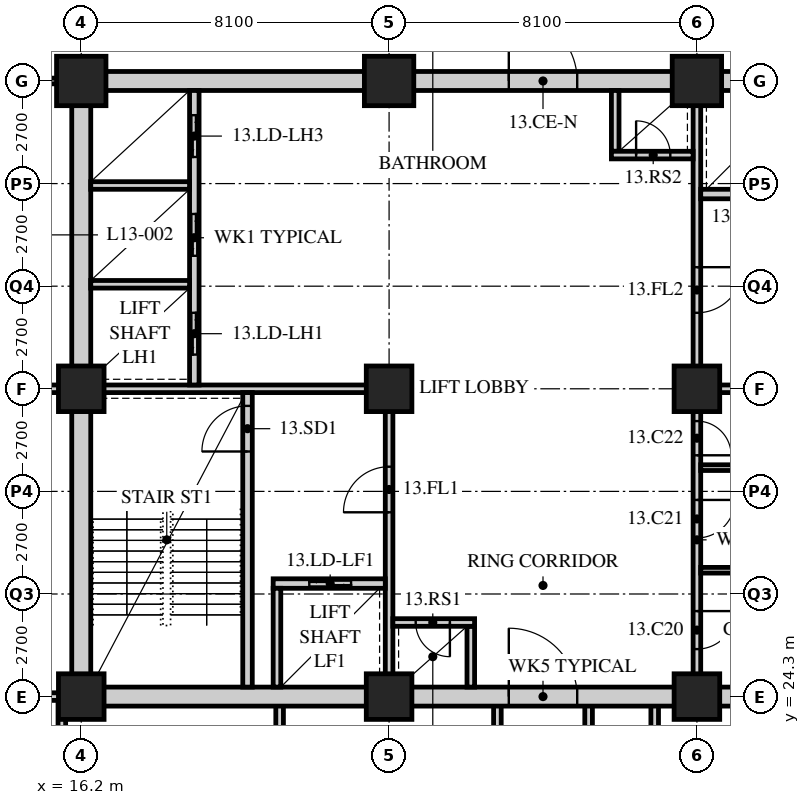
"""IFC4 building model, lengths in metres.
Left out: names, types, materials, properties, quantities, classifications, styles, units other than length and angle.
Written with IfcOpenShell. Run it as: python <this file> out.ifc"""

import sys

from ifc_helpers import new_model, si_unit, direction, frame, frame_2d, origin, origin_2d, place, context, subcontext, project, spatial, rectangle, hollow_rectangle, extrude, element, fill, save


model = new_model("IFC4")
c1 = context("Model", 3, precision=1e-05, world=origin(), true_north=direction((0.0, 1.0)))
c2 = subcontext(c1, "Body", "Model", "MODEL_VIEW")
j1 = project(units=[si_unit("LENGTHUNIT", "METRE"), si_unit("PLANEANGLEUNIT", "RADIAN")], contexts=[c1])
p1 = place(None, origin())
s1 = spatial("IfcSite", under=j1, at=p1, CompositionType="ELEMENT")
p2 = place(p1, origin())
s2 = spatial("IfcBuilding", under=s1, at=p2, CompositionType="ELEMENT")
p3 = place(p2, frame((0.0, 0.0, 56.8)))
s3 = spatial("IfcBuildingStorey", under=s2, at=p3, CompositionType="ELEMENT", Elevation=56.8)
for number, where, z_axis, x_axis in (
    (1, (16.2, 24.3, 0.0), (0.0, 0.0, 1.0), (1.0, 0.0, 0.0)),
    (2, (16.2, 32.4, 0.0), (0.0, 0.0, 1.0), (1.0, 0.0, 0.0)),
):
    element("IfcColumn", number, at=place(p3, frame(where, z_axis=z_axis, x_axis=x_axis)), inside=s3, PredefinedType="COLUMN", context=c2, shape_type="SweptSolid", body=[
        extrude(hollow_rectangle(XDim=1.2, YDim=1.2, WallThickness=0.12, at=origin_2d()), origin(), (0.0, 0.0, 1.0), 3.4),
    ])
p4 = place(p3, frame((16.2, 40.5, 0.0), z_axis=(0.0, 0.0, 1.0), x_axis=(1.0, 0.0, 0.0)))
e3 = element("IfcColumn", 3, at=p4, inside=s3, PredefinedType="COLUMN", context=c2, shape_type="SweptSolid", body=[
    extrude(hollow_rectangle(XDim=1.3, YDim=1.3, WallThickness=0.13, at=origin_2d()), origin(), (0.0, 0.0, 1.0), 3.4),
])
for number, where, z_axis, x_axis in (
    (4, (24.3, 24.3, 0.0), (0.0, 0.0, 1.0), (1.0, 0.0, 0.0)),
    (5, (24.3, 32.4, 0.0), (0.0, 0.0, 1.0), (1.0, 0.0, 0.0)),
):
    element("IfcColumn", number, at=place(p3, frame(where, z_axis=z_axis, x_axis=x_axis)), inside=s3, PredefinedType="COLUMN", context=c2, shape_type="SweptSolid", body=[
        extrude(hollow_rectangle(XDim=1.2, YDim=1.2, WallThickness=0.12, at=origin_2d()), origin(), (0.0, 0.0, 1.0), 3.4),
    ])
p5 = place(p3, frame((24.3, 40.5, 0.0), z_axis=(0.0, 0.0, 1.0), x_axis=(1.0, 0.0, 0.0)))
e6 = element("IfcColumn", 6, at=p5, inside=s3, PredefinedType="COLUMN", context=c2, shape_type="SweptSolid", body=[
    extrude(hollow_rectangle(XDim=1.3, YDim=1.3, WallThickness=0.13, at=origin_2d()), origin(), (0.0, 0.0, 1.0), 3.4),
])
for number, where, z_axis, x_axis in (
    (7, (32.4, 24.3, 0.0), (0.0, 0.0, 1.0), (1.0, 0.0, 0.0)),
    (8, (32.4, 32.4, 0.0), (0.0, 0.0, 1.0), (1.0, 0.0, 0.0)),
):
    element("IfcColumn", number, at=place(p3, frame(where, z_axis=z_axis, x_axis=x_axis)), inside=s3, PredefinedType="COLUMN", context=c2, shape_type="SweptSolid", body=[
        extrude(hollow_rectangle(XDim=1.2, YDim=1.2, WallThickness=0.12, at=origin_2d()), origin(), (0.0, 0.0, 1.0), 3.4),
    ])
p6 = place(p3, frame((32.4, 40.5, 0.0), z_axis=(0.0, 0.0, 1.0), x_axis=(1.0, 0.0, 0.0)))
e9 = element("IfcColumn", 9, at=p6, inside=s3, PredefinedType="COLUMN", context=c2, shape_type="SweptSolid", body=[
    extrude(hollow_rectangle(XDim=1.3, YDim=1.3, WallThickness=0.13, at=origin_2d()), origin(), (0.0, 0.0, 1.0), 3.4),
])
p7 = place(p3, frame((16.0, 40.5, 0.0), z_axis=(0.0, 0.0, 1.0), x_axis=(-1.0, 0.0, 0.0)))
e10 = element("IfcWall", 10, at=p7, inside=s3, PredefinedType="PARTITIONING", context=c2, shape_type="SweptSolid", body=[
    extrude(rectangle(XDim=2.05, YDim=0.15, at=frame_2d((1.025, 0.0))), origin(), (0.0, 0.0, 1.0), 2.578),
])
p8 = place(p3, frame((13.95, 32.4, 0.0), z_axis=(0.0, 0.0, 1.0), x_axis=(1.0, 0.0, 0.0)))
e11 = element("IfcWall", 11, at=p8, inside=s3, PredefinedType="SOLIDWALL", context=c2, shape_type="SweptSolid", body=[
    extrude(rectangle(XDim=2.25, YDim=0.2, at=frame_2d((1.125, 0.0))), origin(), (0.0, 0.0, 1.0), 2.578),
])
for number, where, z_axis, x_axis in (
    (12, (15.689, 13.95, 0.0), (0.0, 0.0, 1.0), (0.0, 1.0, 0.0)),
    (13, (21.42, 13.95, 0.0), (0.0, 0.0, 1.0), (0.0, 1.0, 0.0)),
    (14, (31.289, 13.95, 0.0), (0.0, 0.0, 1.0), (0.0, 1.0, 0.0)),
    (15, (27.15, 13.95, 0.0), (0.0, 0.0, 1.0), (0.0, 1.0, 0.0)),
    (16, (29.55, 13.95, 0.0), (0.0, 0.0, 1.0), (0.0, 1.0, 0.0)),
):
    element("IfcWall", number, at=place(p3, frame(where, z_axis=z_axis, x_axis=x_axis)), inside=s3, PredefinedType="SOLIDWALL", context=c2, shape_type="SweptSolid", body=[
        extrude(rectangle(XDim=10.35, YDim=0.2, at=frame_2d((5.175, 0.0))), origin(), (0.0, 0.0, 1.0), 3.19),
    ])
p9 = place(p3, frame((13.95, 24.3, 0.0), z_axis=(0.0, 0.0, 1.0), x_axis=(1.0, 0.0, 0.0)))
e17 = element("IfcWall", 17, at=p9, inside=s3, PredefinedType="SOLIDWALL", context=c2, shape_type="SweptSolid", body=[
    extrude(rectangle(XDim=2.25, YDim=0.2, at=frame_2d((1.125, 0.0))), origin(), (0.0, 0.0, 1.0), 2.578),
])
p10 = place(p3, frame((15.95, 24.3, 0.0), z_axis=(0.0, 0.0, 1.0), x_axis=(1.0, 0.0, 0.0)))
e18 = element("IfcWall", 18, at=p10, inside=s3, PredefinedType="SOLIDWALL", context=c2, shape_type="SweptSolid", body=[
    extrude(rectangle(XDim=24.8, YDim=0.5, at=frame_2d((12.4, 0.0))), origin(), (0.0, 0.0, 1.0), 2.54),
])
p11 = place(p10, frame((11.5, 0.0, 0.0)))
e19 = element("IfcOpeningElement", 19, at=p11, cuts=e18, PredefinedType="OPENING", context=c2, shape_type="SweptSolid", body=[
    extrude(rectangle(XDim=1.8, YDim=2.4, at=frame_2d((0.9, 1.2))), frame((0.0, 0.26, 0.0), z_axis=(0.0, -1.0, 0.0), x_axis=(1.0, 0.0, 0.0)), (0.0, 0.0, 1.0), 0.52),
])
p12 = place(p3, frame((15.95, 40.5, 0.0), z_axis=(0.0, 0.0, 1.0), x_axis=(1.0, 0.0, 0.0)))
e20 = element("IfcWall", 20, at=p12, inside=s3, PredefinedType="SOLIDWALL", context=c2, shape_type="SweptSolid", body=[
    extrude(rectangle(XDim=24.8, YDim=0.5, at=frame_2d((12.4, 0.0))), origin(), (0.0, 0.0, 1.0), 2.54),
])
p13 = place(p12, frame((11.5, 0.0, 0.0)))
e21 = element("IfcOpeningElement", 21, at=p13, cuts=e20, PredefinedType="OPENING", context=c2, shape_type="SweptSolid", body=[
    extrude(rectangle(XDim=1.8, YDim=2.4, at=frame_2d((0.9, 1.2))), frame((0.0, 0.26, 0.0), z_axis=(0.0, -1.0, 0.0), x_axis=(1.0, 0.0, 0.0)), (0.0, 0.0, 1.0), 0.52),
])
p14 = place(p3, frame((16.2, 24.55, 0.0), z_axis=(0.0, 0.0, 1.0), x_axis=(0.0, 1.0, 0.0)))
e22 = element("IfcWall", 22, at=p14, inside=s3, PredefinedType="SOLIDWALL", context=c2, shape_type="SweptSolid", body=[
    extrude(rectangle(XDim=15.7, YDim=0.5, at=frame_2d((7.85, 0.0))), origin(), (0.0, 0.0, 1.0), 2.578),
])
p15 = place(p3, frame((16.45, 32.4, 0.0), z_axis=(0.0, 0.0, 1.0), x_axis=(1.0, 0.0, 0.0)))
e23 = element("IfcWall", 23, at=p15, inside=s3, PredefinedType="SOLIDWALL", context=c2, shape_type="SweptSolid", body=[
    extrude(rectangle(XDim=7.95, YDim=0.2, at=frame_2d((3.975, 0.0))), origin(), (0.0, 0.0, 1.0), 2.578),
])
p16 = place(p3, frame((24.3, 24.55, 0.0), z_axis=(0.0, 0.0, 1.0), x_axis=(0.0, 1.0, 0.0)))
e24 = element("IfcWall", 24, at=p16, inside=s3, PredefinedType="SOLIDWALL", context=c2, shape_type="SweptSolid", body=[
    extrude(rectangle(XDim=7.75, YDim=0.2, at=frame_2d((3.875, 0.0))), origin(), (0.0, 0.0, 1.0), 2.578),
])
p17 = place(p16, frame((4.6, 0.0, 0.0)))
e25 = element("IfcOpeningElement", 25, at=p17, cuts=e24, PredefinedType="OPENING", context=c2, shape_type="SweptSolid", body=[
    extrude(rectangle(XDim=1.2, YDim=2.1, at=frame_2d((0.6, 1.05))), frame((0.0, 0.11, 0.0), z_axis=(0.0, -1.0, 0.0), x_axis=(1.0, 0.0, 0.0)), (0.0, 0.0, 1.0), 0.22),
])
p18 = place(p3, frame((20.575, 24.55, 0.0), z_axis=(0.0, 0.0, 1.0), x_axis=(0.0, 1.0, 0.0)))
e26 = element("IfcWall", 26, at=p18, inside=s3, PredefinedType="SOLIDWALL", context=c2, shape_type="SweptSolid", body=[
    extrude(rectangle(XDim=7.75, YDim=0.25, at=frame_2d((3.875, 0.0))), origin(), (0.0, 0.0, 1.0), 3.19),
])
p19 = place(p18, frame((6.2, 0.0, 0.0)))
e27 = element("IfcOpeningElement", 27, at=p19, cuts=e26, PredefinedType="OPENING", context=c2, shape_type="SweptSolid", body=[
    extrude(rectangle(XDim=1.2, YDim=2.1, at=frame_2d((0.6, 1.05))), frame((0.0, 0.135, 0.0), z_axis=(0.0, -1.0, 0.0), x_axis=(1.0, 0.0, 0.0)), (0.0, 0.0, 1.0), 0.27),
])
p20 = place(p3, frame((21.25, 27.275, 0.0), z_axis=(0.0, 0.0, 1.0), x_axis=(1.0, 0.0, 0.0)))
e28 = element("IfcWall", 28, at=p20, inside=s3, PredefinedType="SOLIDWALL", context=c2, shape_type="SweptSolid", body=[
    extrude(rectangle(XDim=2.95, YDim=0.25, at=frame_2d((1.475, 0.0))), origin(), (0.0, 0.0, 1.0), 3.19),
])
p21 = place(p20, frame((0.95, 0.0, 0.0)))
e29 = element("IfcOpeningElement", 29, at=p21, cuts=e28, PredefinedType="OPENING", context=c2, shape_type="SweptSolid", body=[
    extrude(rectangle(XDim=1.1, YDim=2.4, at=frame_2d((0.55, 1.2))), frame((0.0, 0.135, 0.0), z_axis=(0.0, -1.0, 0.0), x_axis=(1.0, 0.0, 0.0)), (0.0, 0.0, 1.0), 0.27),
])
p22 = place(p3, frame((21.35, 24.55, 0.0), z_axis=(0.0, 0.0, 1.0), x_axis=(0.0, 1.0, 0.0)))
e30 = element("IfcWall", 30, at=p22, inside=s3, PredefinedType="SOLIDWALL", context=c2, shape_type="SweptSolid", body=[
    extrude(rectangle(XDim=2.6, YDim=0.2, at=frame_2d((1.3, 0.0))), origin(), (0.0, 0.0, 1.0), 3.19),
])
p23 = place(p3, frame((19.175, 32.5, 0.0), z_axis=(0.0, 0.0, 1.0), x_axis=(0.0, 1.0, 0.0)))
e31 = element("IfcWall", 31, at=p23, inside=s3, PredefinedType="SOLIDWALL", context=c2, shape_type="SweptSolid", body=[
    extrude(rectangle(XDim=7.75, YDim=0.25, at=frame_2d((3.875, 0.0))), origin(), (0.0, 0.0, 1.0), 3.19),
])
p24 = place(p23, frame((0.8, 0.0, 0.0)))
e32 = element("IfcOpeningElement", 32, at=p24, cuts=e31, PredefinedType="OPENING", context=c2, shape_type="SweptSolid", body=[
    extrude(rectangle(XDim=1.1, YDim=2.4, at=frame_2d((0.55, 1.2))), frame((0.0, 0.135, 0.0), z_axis=(0.0, -1.0, 0.0), x_axis=(1.0, 0.0, 0.0)), (0.0, 0.0, 1.0), 0.27),
])
p25 = place(p23, frame((3.4, 0.0, 0.0)))
e33 = element("IfcOpeningElement", 33, at=p25, cuts=e31, PredefinedType="OPENING", context=c2, shape_type="SweptSolid", body=[
    extrude(rectangle(XDim=1.1, YDim=2.4, at=frame_2d((0.55, 1.2))), frame((0.0, 0.135, 0.0), z_axis=(0.0, -1.0, 0.0), x_axis=(1.0, 0.0, 0.0)), (0.0, 0.0, 1.0), 0.27),
])
p26 = place(p23, frame((6.0, 0.0, 0.0)))
e34 = element("IfcOpeningElement", 34, at=p26, cuts=e31, PredefinedType="OPENING", context=c2, shape_type="SweptSolid", body=[
    extrude(rectangle(XDim=1.1, YDim=2.4, at=frame_2d((0.55, 1.2))), frame((0.0, 0.135, 0.0), z_axis=(0.0, -1.0, 0.0), x_axis=(1.0, 0.0, 0.0)), (0.0, 0.0, 1.0), 0.27),
])
for number, where, z_axis, x_axis in (
    (35, (16.45, 35.15, 0.0), (0.0, 0.0, 1.0), (1.0, 0.0, 0.0)),
    (36, (16.45, 37.75, 0.0), (0.0, 0.0, 1.0), (1.0, 0.0, 0.0)),
):
    element("IfcWall", number, at=place(p3, frame(where, z_axis=z_axis, x_axis=x_axis)), inside=s3, PredefinedType="SOLIDWALL", context=c2, shape_type="SweptSolid", body=[
        extrude(rectangle(XDim=2.6, YDim=0.2, at=frame_2d((1.3, 0.0))), origin(), (0.0, 0.0, 1.0), 3.19),
    ])
p27 = place(p3, frame((26.45, 24.55, 0.0), z_axis=(0.0, 0.0, 1.0), x_axis=(0.0, 1.0, 0.0)))
e37 = element("IfcWall", 37, at=p27, inside=s3, PredefinedType="SOLIDWALL", context=c2, shape_type="SweptSolid", body=[
    extrude(rectangle(XDim=1.6, YDim=0.2, at=frame_2d((0.8, 0.0))), origin(), (0.0, 0.0, 1.0), 3.19),
])
p28 = place(p3, frame((24.4, 26.25, 0.0), z_axis=(0.0, 0.0, 1.0), x_axis=(1.0, 0.0, 0.0)))
e38 = element("IfcWall", 38, at=p28, inside=s3, PredefinedType="SOLIDWALL", context=c2, shape_type="SweptSolid", body=[
    extrude(rectangle(XDim=2.15, YDim=0.2, at=frame_2d((1.075, 0.0))), origin(), (0.0, 0.0, 1.0), 3.19),
])
p29 = place(p28, frame((0.6, 0.0, 0.0)))
e39 = element("IfcOpeningElement", 39, at=p29, cuts=e38, PredefinedType="OPENING", context=c2, shape_type="SweptSolid", body=[
    extrude(rectangle(XDim=0.9, YDim=2.1, at=frame_2d((0.45, 1.05))), frame((0.0, 0.11, 0.0), z_axis=(0.0, -1.0, 0.0), x_axis=(1.0, 0.0, 0.0)), (0.0, 0.0, 1.0), 0.22),
])
p30 = place(p3, frame((32.3, 32.4, 0.0), z_axis=(0.0, 0.0, 1.0), x_axis=(1.0, 0.0, 0.0)))
e40 = element("IfcWall", 40, at=p30, inside=s3, PredefinedType="SOLIDWALL", context=c2, shape_type="SweptSolid", body=[
    extrude(rectangle(XDim=7.95, YDim=0.2, at=frame_2d((3.975, 0.0))), origin(), (0.0, 0.0, 1.0), 2.578),
])
p31 = place(p3, frame((32.4, 32.5, 0.0), z_axis=(0.0, 0.0, 1.0), x_axis=(0.0, 1.0, 0.0)))
e41 = element("IfcWall", 41, at=p31, inside=s3, PredefinedType="SOLIDWALL", context=c2, shape_type="SweptSolid", body=[
    extrude(rectangle(XDim=7.75, YDim=0.2, at=frame_2d((3.875, 0.0))), origin(), (0.0, 0.0, 1.0), 2.578),
])
p32 = place(p31, frame((1.9, 0.0, 0.0)))
e42 = element("IfcOpeningElement", 42, at=p32, cuts=e41, PredefinedType="OPENING", context=c2, shape_type="SweptSolid", body=[
    extrude(rectangle(XDim=1.2, YDim=2.1, at=frame_2d((0.6, 1.05))), frame((0.0, 0.11, 0.0), z_axis=(0.0, -1.0, 0.0), x_axis=(1.0, 0.0, 0.0)), (0.0, 0.0, 1.0), 0.22),
])
p33 = place(p3, frame((32.5, 37.525, 0.0), z_axis=(0.0, 0.0, 1.0), x_axis=(1.0, 0.0, 0.0)))
e43 = element("IfcWall", 43, at=p33, inside=s3, PredefinedType="SOLIDWALL", context=c2, shape_type="SweptSolid", body=[
    extrude(rectangle(XDim=2.95, YDim=0.25, at=frame_2d((1.475, 0.0))), origin(), (0.0, 0.0, 1.0), 3.19),
])
p34 = place(p33, frame((0.9, 0.0, 0.0)))
e44 = element("IfcOpeningElement", 44, at=p34, cuts=e43, PredefinedType="OPENING", context=c2, shape_type="SweptSolid", body=[
    extrude(rectangle(XDim=1.1, YDim=2.4, at=frame_2d((0.55, 1.2))), frame((0.0, 0.135, 0.0), z_axis=(0.0, -1.0, 0.0), x_axis=(1.0, 0.0, 0.0)), (0.0, 0.0, 1.0), 0.27),
])
p35 = place(p3, frame((30.25, 38.65, 0.0), z_axis=(0.0, 0.0, 1.0), x_axis=(0.0, 1.0, 0.0)))
e45 = element("IfcWall", 45, at=p35, inside=s3, PredefinedType="SOLIDWALL", context=c2, shape_type="SweptSolid", body=[
    extrude(rectangle(XDim=1.6, YDim=0.2, at=frame_2d((0.8, 0.0))), origin(), (0.0, 0.0, 1.0), 3.19),
])
p36 = place(p3, frame((30.15, 38.55, 0.0), z_axis=(0.0, 0.0, 1.0), x_axis=(1.0, 0.0, 0.0)))
e46 = element("IfcWall", 46, at=p36, inside=s3, PredefinedType="SOLIDWALL", context=c2, shape_type="SweptSolid", body=[
    extrude(rectangle(XDim=2.15, YDim=0.2, at=frame_2d((1.075, 0.0))), origin(), (0.0, 0.0, 1.0), 3.19),
])
p37 = place(p36, frame((0.65, 0.0, 0.0)))
e47 = element("IfcOpeningElement", 47, at=p37, cuts=e46, PredefinedType="OPENING", context=c2, shape_type="SweptSolid", body=[
    extrude(rectangle(XDim=0.9, YDim=2.1, at=frame_2d((0.45, 1.05))), frame((0.0, 0.11, 0.0), z_axis=(0.0, -1.0, 0.0), x_axis=(1.0, 0.0, 0.0)), (0.0, 0.0, 1.0), 0.22),
])
p38 = place(p3, frame((32.4, 24.55, 0.0), z_axis=(0.0, 0.0, 1.0), x_axis=(0.0, 1.0, 0.0)))
e48 = element("IfcWall", 48, at=p38, inside=s3, PredefinedType="PARTITIONING", context=c2, shape_type="SweptSolid", body=[
    extrude(rectangle(XDim=7.75, YDim=0.2, at=frame_2d((3.875, 0.0))), origin(), (0.0, 0.0, 1.0), 2.578),
])
p39 = place(p38, frame((1.0, 0.0, 0.0)))
e49 = element("IfcOpeningElement", 49, at=p39, cuts=e48, PredefinedType="OPENING", context=c2, shape_type="SweptSolid", body=[
    extrude(rectangle(XDim=1.0, YDim=2.1, at=frame_2d((0.5, 1.05))), frame((0.0, 0.11, 0.0), z_axis=(0.0, -1.0, 0.0), x_axis=(1.0, 0.0, 0.0)), (0.0, 0.0, 1.0), 0.22),
])
p40 = place(p38, frame((3.925, 0.0, 0.0)))
e50 = element("IfcOpeningElement", 50, at=p40, cuts=e48, PredefinedType="OPENING", context=c2, shape_type="SweptSolid", body=[
    extrude(rectangle(XDim=1.0, YDim=2.1, at=frame_2d((0.5, 1.05))), frame((0.0, 0.11, 0.0), z_axis=(0.0, -1.0, 0.0), x_axis=(1.0, 0.0, 0.0)), (0.0, 0.0, 1.0), 0.22),
])
p41 = place(p38, frame((6.1, 0.0, 0.0)))
e51 = element("IfcOpeningElement", 51, at=p41, cuts=e48, PredefinedType="OPENING", context=c2, shape_type="SweptSolid", body=[
    extrude(rectangle(XDim=0.9, YDim=2.1, at=frame_2d((0.45, 1.05))), frame((0.0, 0.11, 0.0), z_axis=(0.0, -1.0, 0.0), x_axis=(1.0, 0.0, 0.0)), (0.0, 0.0, 1.0), 0.22),
])
for number, where, z_axis, x_axis in (
    (52, (32.5, 27.625, 0.0), (0.0, 0.0, 1.0), (1.0, 0.0, 0.0)),
    (53, (32.5, 30.325, 0.0), (0.0, 0.0, 1.0), (1.0, 0.0, 0.0)),
):
    element("IfcWall", number, at=place(p3, frame(where, z_axis=z_axis, x_axis=x_axis)), inside=s3, PredefinedType="PARTITIONING", context=c2, shape_type="SweptSolid", body=[
        extrude(rectangle(XDim=4.9, YDim=0.15, at=frame_2d((2.45, 0.0))), origin(), (0.0, 0.0, 1.0), 3.19),
    ])
p42 = place(p39, origin())
e54 = element("IfcDoor", 54, at=p42, inside=s3, OperationType="SINGLE_SWING_LEFT", PredefinedType="DOOR", context=c2, shape_type="SweptSolid", body=[
    extrude(rectangle(XDim=1.0, YDim=2.1, at=frame_2d((0.5, 1.05))), frame((0.0, 0.025, 0.0), z_axis=(0.0, -1.0, 0.0), x_axis=(1.0, 0.0, 0.0)), (0.0, 0.0, 1.0), 0.05),
])
fill(e49, e54)
p43 = place(p40, origin())
e55 = element("IfcDoor", 55, at=p43, inside=s3, OperationType="SINGLE_SWING_LEFT", PredefinedType="DOOR", context=c2, shape_type="SweptSolid", body=[
    extrude(rectangle(XDim=1.0, YDim=2.1, at=frame_2d((0.5, 1.05))), frame((0.0, 0.025, 0.0), z_axis=(0.0, -1.0, 0.0), x_axis=(1.0, 0.0, 0.0)), (0.0, 0.0, 1.0), 0.05),
])
fill(e50, e55)
p44 = place(p41, origin())
e56 = element("IfcDoor", 56, at=p44, inside=s3, OperationType="SINGLE_SWING_RIGHT", PredefinedType="DOOR", context=c2, shape_type="SweptSolid", body=[
    extrude(rectangle(XDim=0.9, YDim=2.1, at=frame_2d((0.45, 1.05))), frame((0.0, 0.025, 0.0), z_axis=(0.0, -1.0, 0.0), x_axis=(1.0, 0.0, 0.0)), (0.0, 0.0, 1.0), 0.05),
])
fill(e51, e56)
p45 = place(p19, origin())
e57 = element("IfcDoor", 57, at=p45, inside=s3, OperationType="SINGLE_SWING_LEFT", PredefinedType="DOOR", context=c2, shape_type="SweptSolid", body=[
    extrude(rectangle(XDim=1.2, YDim=2.1, at=frame_2d((0.6, 1.05))), frame((0.0, 0.025, 0.0), z_axis=(0.0, -1.0, 0.0), x_axis=(1.0, 0.0, 0.0)), (0.0, 0.0, 1.0), 0.05),
])
fill(e27, e57)
p46 = place(p17, origin())
e58 = element("IfcDoor", 58, at=p46, inside=s3, OperationType="SINGLE_SWING_LEFT", PredefinedType="DOOR", context=c2, shape_type="SweptSolid", body=[
    extrude(rectangle(XDim=1.2, YDim=2.1, at=frame_2d((0.6, 1.05))), frame((0.0, 0.025, 0.0), z_axis=(0.0, -1.0, 0.0), x_axis=(1.0, 0.0, 0.0)), (0.0, 0.0, 1.0), 0.05),
])
fill(e25, e58)
p47 = place(p29, origin())
e59 = element("IfcDoor", 59, at=p47, inside=s3, OperationType="SINGLE_SWING_LEFT", PredefinedType="DOOR", context=c2, shape_type="SweptSolid", body=[
    extrude(rectangle(XDim=0.9, YDim=2.1, at=frame_2d((0.45, 1.05))), frame((0.0, 0.025, 0.0), z_axis=(0.0, -1.0, 0.0), x_axis=(1.0, 0.0, 0.0)), (0.0, 0.0, 1.0), 0.05),
])
fill(e39, e59)
p48 = place(p32, origin())
e60 = element("IfcDoor", 60, at=p48, inside=s3, OperationType="SINGLE_SWING_LEFT", PredefinedType="DOOR", context=c2, shape_type="SweptSolid", body=[
    extrude(rectangle(XDim=1.2, YDim=2.1, at=frame_2d((0.6, 1.05))), frame((0.0, 0.025, 0.0), z_axis=(0.0, -1.0, 0.0), x_axis=(1.0, 0.0, 0.0)), (0.0, 0.0, 1.0), 0.05),
])
fill(e42, e60)
p49 = place(p37, origin())
e61 = element("IfcDoor", 61, at=p49, inside=s3, OperationType="SINGLE_SWING_LEFT", PredefinedType="DOOR", context=c2, shape_type="SweptSolid", body=[
    extrude(rectangle(XDim=0.9, YDim=2.1, at=frame_2d((0.45, 1.05))), frame((0.0, 0.025, 0.0), z_axis=(0.0, -1.0, 0.0), x_axis=(1.0, 0.0, 0.0)), (0.0, 0.0, 1.0), 0.05),
])
fill(e47, e61)
p50 = place(p24, origin())
e62 = element("IfcDoor", 62, at=p50, inside=s3, OperationType="DOUBLE_DOOR_SLIDING", PredefinedType="DOOR", context=c2, shape_type="SweptSolid", body=[
    extrude(rectangle(XDim=1.1, YDim=2.4, at=frame_2d((0.55, 1.2))), frame((0.0, 0.025, 0.0), z_axis=(0.0, -1.0, 0.0), x_axis=(1.0, 0.0, 0.0)), (0.0, 0.0, 1.0), 0.05),
])
fill(e32, e62)
p51 = place(p25, origin())
e63 = element("IfcDoor", 63, at=p51, inside=s3, OperationType="DOUBLE_DOOR_SLIDING", PredefinedType="DOOR", context=c2, shape_type="SweptSolid", body=[
    extrude(rectangle(XDim=1.1, YDim=2.4, at=frame_2d((0.55, 1.2))), frame((0.0, 0.025, 0.0), z_axis=(0.0, -1.0, 0.0), x_axis=(1.0, 0.0, 0.0)), (0.0, 0.0, 1.0), 0.05),
])
fill(e33, e63)
p52 = place(p26, origin())
e64 = element("IfcDoor", 64, at=p52, inside=s3, OperationType="DOUBLE_DOOR_SLIDING", PredefinedType="DOOR", context=c2, shape_type="SweptSolid", body=[
    extrude(rectangle(XDim=1.1, YDim=2.4, at=frame_2d((0.55, 1.2))), frame((0.0, 0.025, 0.0), z_axis=(0.0, -1.0, 0.0), x_axis=(1.0, 0.0, 0.0)), (0.0, 0.0, 1.0), 0.05),
])
fill(e34, e64)
p53 = place(p21, origin())
e65 = element("IfcDoor", 65, at=p53, inside=s3, OperationType="DOUBLE_DOOR_SLIDING", PredefinedType="DOOR", context=c2, shape_type="SweptSolid", body=[
    extrude(rectangle(XDim=1.1, YDim=2.4, at=frame_2d((0.55, 1.2))), frame((0.0, 0.025, 0.0), z_axis=(0.0, -1.0, 0.0), x_axis=(1.0, 0.0, 0.0)), (0.0, 0.0, 1.0), 0.05),
])
fill(e29, e65)
p54 = place(p11, origin())
e66 = element("IfcDoor", 66, at=p54, inside=s3, OperationType="DOUBLE_DOOR_SINGLE_SWING", PredefinedType="DOOR", context=c2, shape_type="SweptSolid", body=[
    extrude(rectangle(XDim=1.8, YDim=2.4, at=frame_2d((0.9, 1.2))), frame((0.0, 0.025, 0.0), z_axis=(0.0, -1.0, 0.0), x_axis=(1.0, 0.0, 0.0)), (0.0, 0.0, 1.0), 0.05),
])
fill(e19, e66)
p55 = place(p13, origin())
e67 = element("IfcDoor", 67, at=p55, inside=s3, OperationType="DOUBLE_DOOR_SINGLE_SWING", PredefinedType="DOOR", context=c2, shape_type="SweptSolid", body=[
    extrude(rectangle(XDim=1.8, YDim=2.4, at=frame_2d((0.9, 1.2))), frame((0.0, 0.025, 0.0), z_axis=(0.0, -1.0, 0.0), x_axis=(1.0, 0.0, 0.0)), (0.0, 0.0, 1.0), 0.05),
])
fill(e21, e67)
save(model, sys.argv[1])
